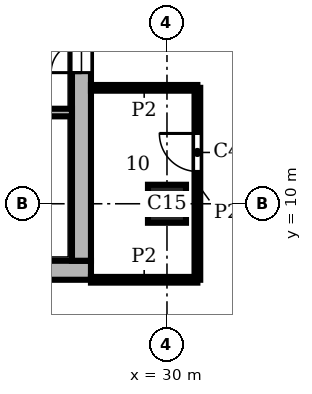
"""IFC4 building model, lengths in metres.
Left out: names, types, materials, properties, quantities, classifications, styles, units other than length and angle.
Written with IfcOpenShell. Run it as: python <this file> out.ifc"""

import sys

from ifc_helpers import new_model, si_unit, direction, frame, frame_2d, origin, origin_2d, place, context, subcontext, project, spatial, rectangle, extrude, element, fill, save


model = new_model("IFC4")
c1 = context("Model", 3, precision=1e-05, world=origin(), true_north=direction((0.0, 1.0)))
c2 = subcontext(c1, "Body", "Model", "MODEL_VIEW")
j1 = project(units=[si_unit("LENGTHUNIT", "METRE"), si_unit("PLANEANGLEUNIT", "RADIAN")], contexts=[c1])
p1 = place(None, origin())
s1 = spatial("IfcSite", under=j1, at=p1, CompositionType="ELEMENT")
p2 = place(p1, origin())
s2 = spatial("IfcBuilding", under=s1, at=p2, CompositionType="ELEMENT")
p3 = place(p2, frame((0.0, 0.0, 278.7)))
s3 = spatial("IfcBuildingStorey", under=s2, at=p3, CompositionType="ELEMENT", Elevation=278.7)
p4 = place(p3, frame((30.0, 10.0, 0.0), z_axis=(0.0, 0.0, 1.0), x_axis=(1.0, 0.0, 0.0)))
e1 = element("IfcColumn", 1, at=p4, inside=s3, PredefinedType="COLUMN", context=c2, shape_type="SweptSolid", body=[
    extrude(rectangle(XDim=1.0, YDim=1.0, at=origin_2d()), origin(), (0.0, 0.0, 1.0), 3.9),
])
p5 = place(p3, frame((8.0, 8.25, 0.0), z_axis=(0.0, 0.0, 1.0), x_axis=(1.0, 0.0, 0.0)))
e2 = element("IfcWall", 2, at=p5, inside=s3, PredefinedType="SHEAR", context=c2, shape_type="SweptSolid", body=[
    extrude(rectangle(XDim=20.0, YDim=0.5, at=frame_2d((10.0, 0.0))), origin(), (0.0, 0.0, 1.0), 3.9),
])
p6 = place(p3, frame((27.75, 8.5, 0.0), z_axis=(0.0, 0.0, 1.0), x_axis=(0.0, 1.0, 0.0)))
e3 = element("IfcWall", 3, at=p6, inside=s3, PredefinedType="SHEAR", context=c2, shape_type="SweptSolid", body=[
    extrude(rectangle(XDim=19.0, YDim=0.5, at=frame_2d((9.5, 0.0))), origin(), (0.0, 0.0, 1.0), 3.9),
])
p7 = place(p6, frame((4.95, 0.0, 0.0)))
e4 = element("IfcOpeningElement", 4, at=p7, cuts=e3, PredefinedType="OPENING", context=c2, shape_type="SweptSolid", body=[
    extrude(rectangle(XDim=1.6, YDim=2.1, at=frame_2d((0.8, 1.05))), frame((0.0, 0.26, 0.0), z_axis=(0.0, -1.0, 0.0), x_axis=(1.0, 0.0, 0.0)), (0.0, 0.0, 1.0), 0.52),
])
p8 = place(p3, frame((13.8, 12.4, 0.0), z_axis=(0.0, 0.0, 1.0), x_axis=(1.0, 0.0, 0.0)))
e5 = element("IfcWall", 5, at=p8, inside=s3, PredefinedType="SHEAR", context=c2, shape_type="SweptSolid", body=[
    extrude(rectangle(XDim=13.7, YDim=0.2, at=frame_2d((6.85, 0.0))), origin(), (0.0, 0.0, 1.0), 3.58),
])
p9 = place(p8, frame((2.4, 0.0, 0.0)))
e6 = element("IfcOpeningElement", 6, at=p9, cuts=e5, PredefinedType="OPENING", context=c2, shape_type="SweptSolid", body=[
    extrude(rectangle(XDim=1.1, YDim=2.1, at=frame_2d((0.55, 1.05))), frame((0.0, 0.11, 0.0), z_axis=(0.0, -1.0, 0.0), x_axis=(1.0, 0.0, 0.0)), (0.0, 0.0, 1.0), 0.22),
])
p10 = place(p8, frame((4.9, 0.0, 0.0)))
e7 = element("IfcOpeningElement", 7, at=p10, cuts=e5, PredefinedType="OPENING", context=c2, shape_type="SweptSolid", body=[
    extrude(rectangle(XDim=1.1, YDim=2.1, at=frame_2d((0.55, 1.05))), frame((0.0, 0.11, 0.0), z_axis=(0.0, -1.0, 0.0), x_axis=(1.0, 0.0, 0.0)), (0.0, 0.0, 1.0), 0.22),
])
p11 = place(p8, frame((0.15, 0.0, 0.0)))
e8 = element("IfcOpeningElement", 8, at=p11, cuts=e5, PredefinedType="OPENING", context=c2, shape_type="SweptSolid", body=[
    extrude(rectangle(XDim=1.0, YDim=2.1, at=frame_2d((0.5, 1.05))), frame((0.0, 0.11, 0.0), z_axis=(0.0, -1.0, 0.0), x_axis=(1.0, 0.0, 0.0)), (0.0, 0.0, 1.0), 0.22),
])
p12 = place(p3, frame((30.8, 8.0, 0.0), z_axis=(0.0, 0.0, 1.0), x_axis=(0.0, 1.0, 0.0)))
e9 = element("IfcWall", 9, at=p12, inside=s3, PredefinedType="PARTITIONING", context=c2, shape_type="SweptSolid", body=[
    extrude(rectangle(XDim=5.05, YDim=0.15, at=frame_2d((2.525, 0.0))), origin(), (0.0, 0.0, 1.0), 3.58),
])
p13 = place(p12, frame((2.85, 0.0, 0.0)))
e10 = element("IfcOpeningElement", 10, at=p13, cuts=e9, PredefinedType="OPENING", context=c2, shape_type="SweptSolid", body=[
    extrude(rectangle(XDim=1.0, YDim=2.1, at=frame_2d((0.5, 1.05))), frame((0.0, 0.085, 0.0), z_axis=(0.0, -1.0, 0.0), x_axis=(1.0, 0.0, 0.0)), (0.0, 0.0, 1.0), 0.17),
])
for number, where, z_axis, x_axis in (
    (11, (28.0, 8.0, 0.0), (0.0, 0.0, 1.0), (1.0, 0.0, 0.0)),
    (12, (28.0, 13.05, 0.0), (0.0, 0.0, 1.0), (1.0, 0.0, 0.0)),
):
    element("IfcWall", number, at=place(p3, frame(where, z_axis=z_axis, x_axis=x_axis)), inside=s3, PredefinedType="PARTITIONING", context=c2, shape_type="SweptSolid", body=[
        extrude(rectangle(XDim=2.8, YDim=0.15, at=frame_2d((1.4, 0.0))), origin(), (0.0, 0.0, 1.0), 3.58),
    ])
p14 = place(p7, origin())
e13 = element("IfcDoor", 13, at=p14, inside=s3, OperationType="DOUBLE_DOOR_SINGLE_SWING", PredefinedType="DOOR", context=c2, shape_type="SweptSolid", body=[
    extrude(rectangle(XDim=1.6, YDim=2.1, at=frame_2d((0.8, 1.05))), frame((0.0, 0.025, 0.0), z_axis=(0.0, -1.0, 0.0), x_axis=(1.0, 0.0, 0.0)), (0.0, 0.0, 1.0), 0.05),
])
fill(e4, e13)
p15 = place(p13, origin())
e14 = element("IfcDoor", 14, at=p15, inside=s3, OperationType="SINGLE_SWING_RIGHT", PredefinedType="DOOR", context=c2, shape_type="SweptSolid", body=[
    extrude(rectangle(XDim=1.0, YDim=2.1, at=frame_2d((0.5, 1.05))), frame((0.0, 0.025, 0.0), z_axis=(0.0, -1.0, 0.0), x_axis=(1.0, 0.0, 0.0)), (0.0, 0.0, 1.0), 0.05),
])
fill(e10, e14)
save(model, sys.argv[1])
